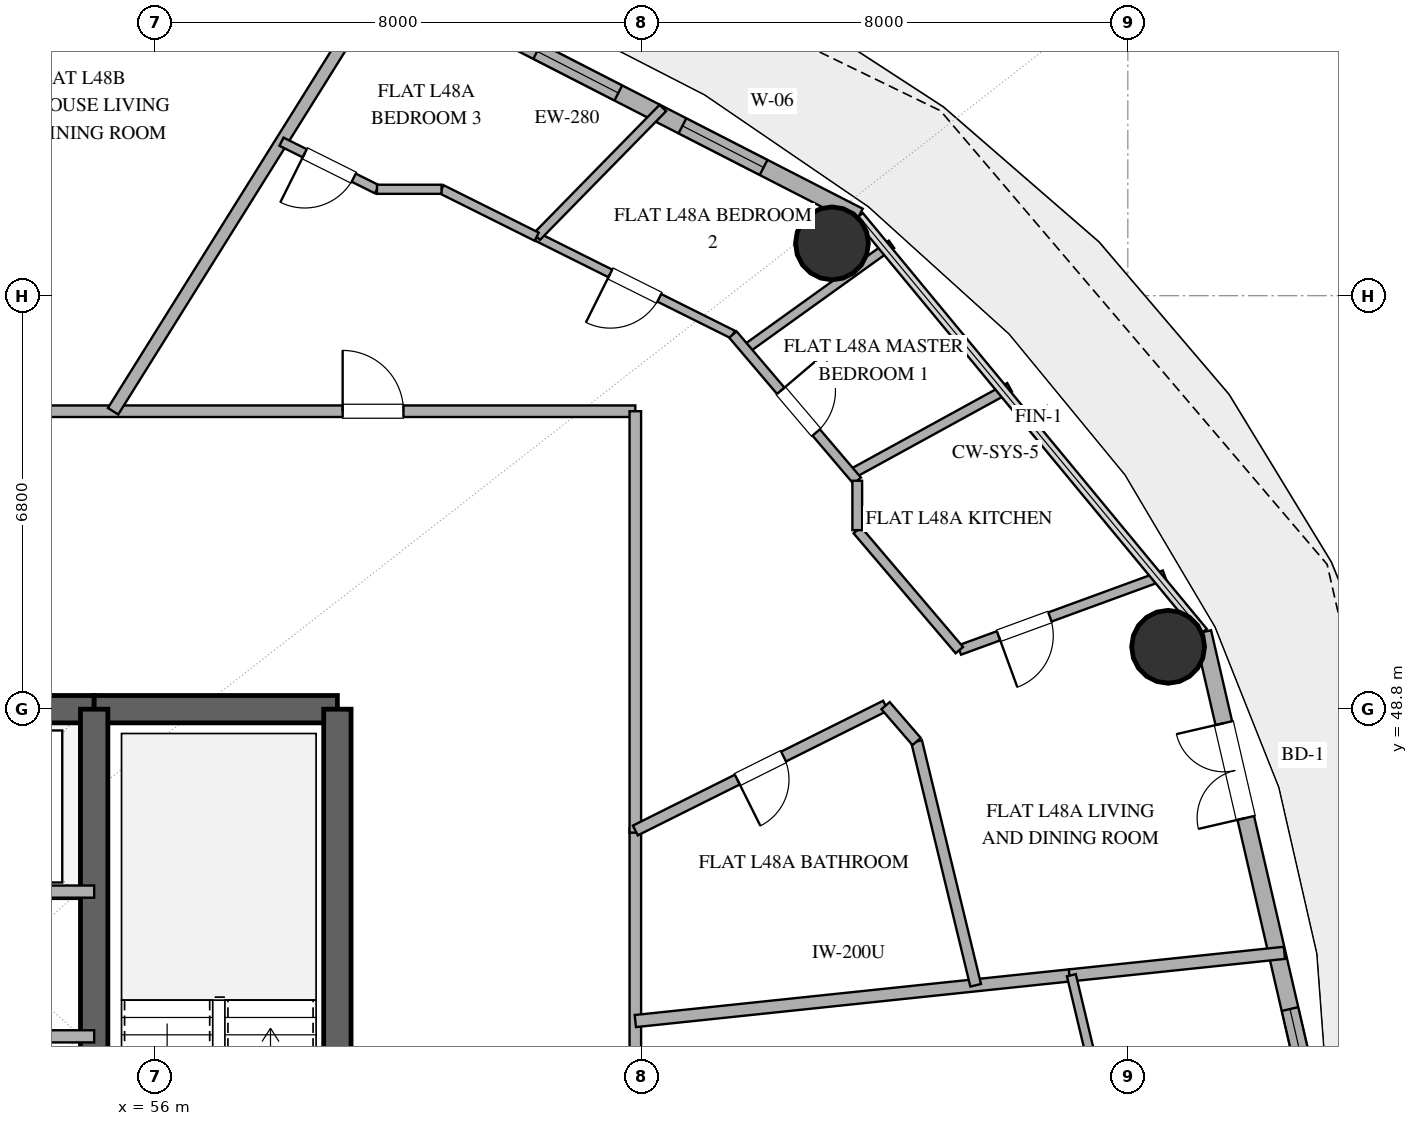
"""IFC4 building model, lengths in metres.
Left out: names, types, materials, properties, quantities, classifications, styles, units other than length and angle.
Written with IfcOpenShell. Run it as: python <this file> out.ifc"""

import sys

from ifc_helpers import new_model, si_unit, direction, frame, frame_2d, origin, origin_2d, place, context, subcontext, project, spatial, rectangle, hollow_circle, extrude, element, fill, save


model = new_model("IFC4")
c1 = context("Model", 3, precision=1e-05, world=origin(), true_north=direction((0.0, 1.0)))
c2 = subcontext(c1, "Body", "Model", "MODEL_VIEW")
j1 = project(units=[si_unit("LENGTHUNIT", "METRE"), si_unit("PLANEANGLEUNIT", "RADIAN")], contexts=[c1])
p1 = place(None, origin())
s1 = spatial("IfcSite", under=j1, at=p1, CompositionType="ELEMENT")
p2 = place(p1, origin())
s2 = spatial("IfcBuilding", under=s1, at=p2, CompositionType="ELEMENT")
p3 = place(p2, frame((0.0, 0.0, 190.2)))
s3 = spatial("IfcBuildingStorey", under=s2, at=p3, CompositionType="ELEMENT", Elevation=190.2)
p4 = place(p3, frame((41.0, 48.8, 0.0), z_axis=(0.0, 0.0, 1.0), x_axis=(1.0, 0.0, 0.0)))
e1 = element("IfcWall", 1, at=p4, inside=s3, PredefinedType="SHEAR", context=c2, shape_type="SweptSolid", body=[
    extrude(rectangle(XDim=14.0, YDim=0.45, at=frame_2d((7.0, 0.0))), origin(), (0.0, 0.0, 1.0), 3.38),
])
p5 = place(p4, frame((6.1, 0.0, 0.0)))
e2 = element("IfcOpeningElement", 2, at=p5, cuts=e1, PredefinedType="OPENING", context=c2, shape_type="SweptSolid", body=[
    extrude(rectangle(XDim=1.8, YDim=2.25, at=frame_2d((0.9, 1.125))), frame((0.0, 0.235, 0.0), z_axis=(0.0, -1.0, 0.0), x_axis=(1.0, 0.0, 0.0)), (0.0, 0.0, 1.0), 0.47),
])
p6 = place(p3, frame((55.0, 48.8, 0.0), z_axis=(0.0, 0.0, 1.0), x_axis=(1.0, 0.0, 0.0)))
e3 = element("IfcWall", 3, at=p6, inside=s3, PredefinedType="SHEAR", context=c2, shape_type="SweptSolid", body=[
    extrude(rectangle(XDim=4.0, YDim=0.45, at=frame_2d((2.0, 0.0))), origin(), (0.0, 0.0, 1.0), 3.38),
])
p7 = place(p3, frame((59.0, 35.2, 0.0), z_axis=(0.0, 0.0, 1.0), x_axis=(0.0, 1.0, 0.0)))
e4 = element("IfcWall", 4, at=p7, inside=s3, PredefinedType="SHEAR", context=c2, shape_type="SweptSolid", body=[
    extrude(rectangle(XDim=13.6, YDim=0.45, at=frame_2d((6.8, 0.0))), origin(), (0.0, 0.0, 1.0), 3.38),
])
p8 = place(p3, frame((55.0, 35.2, 0.0), z_axis=(0.0, 0.0, 1.0), x_axis=(0.0, 1.0, 0.0)))
e5 = element("IfcWall", 5, at=p8, inside=s3, PredefinedType="SHEAR", context=c2, shape_type="SweptSolid", body=[
    extrude(rectangle(XDim=13.6, YDim=0.45, at=frame_2d((6.8, 0.0))), origin(), (0.0, 0.0, 1.0), 3.38),
])
p9 = place(p8, frame((1.15, 0.0, 0.0)))
e6 = element("IfcOpeningElement", 6, at=p9, cuts=e5, PredefinedType="OPENING", context=c2, shape_type="SweptSolid", body=[
    extrude(rectangle(XDim=1.1, YDim=2.2, at=frame_2d((0.55, 1.1))), frame((0.0, 0.235, 0.0), z_axis=(0.0, -1.0, 0.0), x_axis=(1.0, 0.0, 0.0)), (0.0, 0.0, 1.0), 0.47),
])
for number, where, z_axis, x_axis in (
    (7, (72.662, 49.826, 0.0), (0.0, 0.0, 1.0), (1.0, 0.0, 0.0)),
    (8, (67.134, 56.46, 0.0), (0.0, 0.0, 1.0), (1.0, 0.0, 0.0)),
):
    element("IfcColumn", number, at=place(p3, frame(where, z_axis=z_axis, x_axis=x_axis)), inside=s3, PredefinedType="COLUMN", context=c2, shape_type="SweptSolid", body=[
        extrude(hollow_circle(Radius=0.6, WallThickness=0.032, at=origin_2d()), origin(), (0.0, 0.0, 1.0), 3.38),
    ])
p10 = place(p3, frame((75.099, 42.0, 0.0), z_axis=(0.0, 0.0, 1.0), x_axis=(-0.225473184558, 0.974249374157, 0.0)))
e9 = element("IfcWall", 9, at=p10, inside=s3, PredefinedType="SOLIDWALL", context=c2, shape_type="SweptSolid", body=[
    extrude(rectangle(XDim=8.28, YDim=0.28, at=frame_2d((4.14, 0.0))), origin(), (0.0, 0.0, 1.0), 3.38),
])
p11 = place(p10, frame((5.144, 0.0, 0.0)))
e10 = element("IfcOpeningElement", 10, at=p11, cuts=e9, PredefinedType="OPENING", context=c2, shape_type="SweptSolid", body=[
    extrude(rectangle(XDim=1.6, YDim=2.25, at=frame_2d((0.8, 1.125))), frame((0.0, 0.15, 0.0), z_axis=(0.0, -1.0, 0.0), x_axis=(1.0, 0.0, 0.0)), (0.0, 0.0, 1.0), 0.3),
])
p12 = place(p10, frame((0.918, 0.0, 0.85)))
e11 = element("IfcOpeningElement", 11, at=p12, cuts=e9, PredefinedType="OPENING", context=c2, shape_type="SweptSolid", body=[
    extrude(rectangle(XDim=1.0, YDim=1.8, at=frame_2d((0.5, 0.9))), frame((0.0, 0.15, 0.0), z_axis=(0.0, -1.0, 0.0), x_axis=(1.0, 0.0, 0.0)), (0.0, 0.0, 1.0), 0.3),
])
p13 = place(p3, frame((67.576, 56.906, 0.0), z_axis=(0.0, 0.0, 1.0), x_axis=(-0.889872523182, 0.456209263919, 0.0)))
e12 = element("IfcWall", 12, at=p13, inside=s3, PredefinedType="SOLIDWALL", context=c2, shape_type="SweptSolid", body=[
    extrude(rectangle(XDim=10.016, YDim=0.28, at=frame_2d((5.008, 0.0))), origin(), (0.0, 0.0, 1.0), 3.38),
])
p14 = place(p13, frame((1.76, 0.0, 0.85)))
e13 = element("IfcOpeningElement", 13, at=p14, cuts=e12, PredefinedType="OPENING", context=c2, shape_type="SweptSolid", body=[
    extrude(rectangle(XDim=1.5, YDim=2.0, at=frame_2d((0.75, 1.0))), frame((0.0, 0.15, 0.0), z_axis=(0.0, -1.0, 0.0), x_axis=(1.0, 0.0, 0.0)), (0.0, 0.0, 1.0), 0.3),
])
p15 = place(p13, frame((4.445, 0.0, 0.85)))
e14 = element("IfcOpeningElement", 14, at=p15, cuts=e12, PredefinedType="OPENING", context=c2, shape_type="SweptSolid", body=[
    extrude(rectangle(XDim=1.5, YDim=1.8, at=frame_2d((0.75, 0.9))), frame((0.0, 0.15, 0.0), z_axis=(0.0, -1.0, 0.0), x_axis=(1.0, 0.0, 0.0)), (0.0, 0.0, 1.0), 0.3),
])
p16 = place(p13, frame((6.459, 0.0, 0.85)))
e15 = element("IfcOpeningElement", 15, at=p16, cuts=e12, PredefinedType="OPENING", context=c2, shape_type="SweptSolid", body=[
    extrude(rectangle(XDim=1.5, YDim=1.8, at=frame_2d((0.75, 0.9))), frame((0.0, 0.15, 0.0), z_axis=(0.0, -1.0, 0.0), x_axis=(1.0, 0.0, 0.0)), (0.0, 0.0, 1.0), 0.3),
])
for number, where, z_axis, x_axis in (
    (16, (52.05, 43.42, 0.0), (0.0, 0.0, 1.0), (1.0, 0.0, 0.0)),
    (17, (52.05, 45.8, 0.0), (0.0, 0.0, 1.0), (1.0, 0.0, 0.0)),
):
    element("IfcWall", number, at=place(p3, frame(where, z_axis=z_axis, x_axis=x_axis)), inside=s3, PredefinedType="SOLIDWALL", context=c2, shape_type="SweptSolid", body=[
        extrude(rectangle(XDim=2.95, YDim=0.2, at=frame_2d((1.475, 0.0))), origin(), (0.0, 0.0, 1.0), 2.74),
    ])
p17 = place(p3, frame((44.784, 53.7, 0.0), z_axis=(0.0, 0.0, 1.0), x_axis=(1.0, 0.0, 0.0)))
e18 = element("IfcWall", 18, at=p17, inside=s3, PredefinedType="PARTITIONING", context=c2, shape_type="SweptSolid", body=[
    extrude(rectangle(XDim=19.116, YDim=0.19, at=frame_2d((9.558, 0.0))), origin(), (0.0, 0.0, 1.0), 2.74),
])
p18 = place(p17, frame((14.302, 0.0, 0.0)))
e19 = element("IfcOpeningElement", 19, at=p18, cuts=e18, PredefinedType="OPENING", context=c2, shape_type="SweptSolid", body=[
    extrude(rectangle(XDim=1.0, YDim=2.2, at=frame_2d((0.5, 1.1))), frame((0.0, 0.105, 0.0), z_axis=(0.0, -1.0, 0.0), x_axis=(1.0, 0.0, 0.0)), (0.0, 0.0, 1.0), 0.21),
])
p19 = place(p17, frame((6.783, 0.0, 0.0)))
e20 = element("IfcOpeningElement", 20, at=p19, cuts=e18, PredefinedType="OPENING", context=c2, shape_type="SweptSolid", body=[
    extrude(rectangle(XDim=1.0, YDim=2.2, at=frame_2d((0.5, 1.1))), frame((0.0, 0.105, 0.0), z_axis=(0.0, -1.0, 0.0), x_axis=(1.0, 0.0, 0.0)), (0.0, 0.0, 1.0), 0.21),
])
p20 = place(p3, frame((63.9, 46.841, 0.0), z_axis=(0.0, 0.0, 1.0), x_axis=(0.0, -1.0, 0.0)))
e21 = element("IfcWall", 21, at=p20, inside=s3, PredefinedType="PARTITIONING", context=c2, shape_type="SweptSolid", body=[
    extrude(rectangle(XDim=12.632, YDim=0.19, at=frame_2d((6.316, 0.0))), origin(), (0.0, 0.0, 1.0), 2.74),
])
p21 = place(p3, frame((63.9, 53.7, 0.0), z_axis=(0.0, 0.0, 1.0), x_axis=(0.0, -1.0, 0.0)))
e22 = element("IfcWall", 22, at=p21, inside=s3, PredefinedType="PARTITIONING", context=c2, shape_type="SweptSolid", body=[
    extrude(rectangle(XDim=6.931, YDim=0.19, at=frame_2d((3.465, 0.0))), origin(), (0.0, 0.0, 1.0), 2.74),
])
p22 = place(p3, frame((63.9, 43.671, 0.0), z_axis=(0.0, 0.0, 1.0), x_axis=(0.994523063153, 0.104517351942, 0.0)))
e23 = element("IfcWall", 23, at=p22, inside=s3, PredefinedType="PARTITIONING", context=c2, shape_type="SweptSolid", body=[
    extrude(rectangle(XDim=7.211, YDim=0.2, at=frame_2d((3.605, 0.0))), origin(), (0.0, 0.0, 1.0), 2.74),
])
p23 = place(p3, frame((55.311, 53.7, 0.0), z_axis=(0.0, 0.0, 1.0), x_axis=(0.529914717401, 0.848050937315, 0.0)))
e24 = element("IfcWall", 24, at=p23, inside=s3, PredefinedType="PARTITIONING", context=c2, shape_type="SweptSolid", body=[
    extrude(rectangle(XDim=8.599, YDim=0.2, at=frame_2d((4.299, 0.0))), origin(), (0.0, 0.0, 1.0), 2.74),
])
p24 = place(p3, frame((68.016, 48.858, 0.0), z_axis=(0.0, 0.0, 1.0), x_axis=(-0.894872643331, -0.446321579377, 0.0)))
e25 = element("IfcWall", 25, at=p24, inside=s3, PredefinedType="PLUMBINGWALL", context=c2, shape_type="SweptSolid", body=[
    extrude(rectangle(XDim=4.599, YDim=0.18, at=frame_2d((2.3, 0.0))), origin(), (0.0, 0.0, 1.0), 2.74),
])
p25 = place(p24, frame((1.875, 0.0, 0.0)))
e26 = element("IfcOpeningElement", 26, at=p25, cuts=e25, PredefinedType="OPENING", context=c2, shape_type="SweptSolid", body=[
    extrude(rectangle(XDim=0.85, YDim=2.1, at=frame_2d((0.425, 1.05))), frame((0.0, 0.1, 0.0), z_axis=(0.0, -1.0, 0.0), x_axis=(1.0, 0.0, 0.0)), (0.0, 0.0, 1.0), 0.2),
])
p26 = place(p3, frame((69.498, 44.26, 0.0), z_axis=(0.0, 0.0, 1.0), x_axis=(-0.235510241151, 0.97187186723, 0.0)))
e27 = element("IfcWall", 27, at=p26, inside=s3, PredefinedType="PLUMBINGWALL", context=c2, shape_type="SweptSolid", body=[
    extrude(rectangle(XDim=4.125, YDim=0.18, at=frame_2d((2.062, 0.0))), origin(), (0.0, 0.0, 1.0), 2.74),
])
p27 = place(p3, frame((65.505, 54.961, 0.0), z_axis=(0.0, 0.0, 1.0), x_axis=(-0.894941244144, 0.4461840086, 0.0)))
e28 = element("IfcWall", 28, at=p27, inside=s3, PredefinedType="PARTITIONING", context=c2, shape_type="SweptSolid", body=[
    extrude(rectangle(XDim=3.605, YDim=0.14, at=frame_2d((1.803, 0.0))), origin(), (0.0, 0.0, 1.0), 2.74),
])
p28 = place(p27, frame((1.353, 0.0, 0.0)))
e29 = element("IfcOpeningElement", 29, at=p28, cuts=e28, PredefinedType="OPENING", context=c2, shape_type="SweptSolid", body=[
    extrude(rectangle(XDim=0.9, YDim=2.1, at=frame_2d((0.45, 1.05))), frame((0.0, 0.08, 0.0), z_axis=(0.0, -1.0, 0.0), x_axis=(1.0, 0.0, 0.0)), (0.0, 0.0, 1.0), 0.16),
])
p29 = place(p3, frame((72.603, 51.006, 0.0), z_axis=(0.0, 0.0, 1.0), x_axis=(-0.939057046145, -0.343761347572, 0.0)))
e30 = element("IfcWall", 30, at=p29, inside=s3, PredefinedType="PLUMBINGWALL", context=c2, shape_type="SweptSolid", body=[
    extrude(rectangle(XDim=3.592, YDim=0.16, at=frame_2d((1.796, 0.0))), origin(), (0.0, 0.0, 1.0), 2.74),
])
p30 = place(p29, frame((2.006, 0.0, 0.0)))
e31 = element("IfcOpeningElement", 31, at=p30, cuts=e30, PredefinedType="OPENING", context=c2, shape_type="SweptSolid", body=[
    extrude(rectangle(XDim=0.9, YDim=2.1, at=frame_2d((0.45, 1.05))), frame((0.0, 0.09, 0.0), z_axis=(0.0, -1.0, 0.0), x_axis=(1.0, 0.0, 0.0)), (0.0, 0.0, 1.0), 0.18),
])
p31 = place(p3, frame((74.575, 44.793, 0.0), z_axis=(0.0, 0.0, 1.0), x_axis=(-0.994516359121, -0.104581123727, 0.0)))
e32 = element("IfcWall", 32, at=p31, inside=s3, PredefinedType="PARTITIONING", context=c2, shape_type="SweptSolid", body=[
    extrude(rectangle(XDim=3.555, YDim=0.2, at=frame_2d((1.778, 0.0))), origin(), (0.0, 0.0, 1.0), 2.74),
])
p32 = place(p3, frame((67.455, 52.668, 0.0), z_axis=(0.0, 0.0, 1.0), x_axis=(0.876839283097, 0.480783601653, 0.0)))
e33 = element("IfcWall", 33, at=p32, inside=s3, PredefinedType="PLUMBINGWALL", context=c2, shape_type="SweptSolid", body=[
    extrude(rectangle(XDim=2.965, YDim=0.16, at=frame_2d((1.482, 0.0))), origin(), (0.0, 0.0, 1.0), 2.74),
])
p33 = place(p3, frame((64.353, 58.687, 0.0), z_axis=(0.0, 0.0, 1.0), x_axis=(-0.699905055024, -0.714235895172, 0.0)))
e34 = element("IfcWall", 34, at=p33, inside=s3, PredefinedType="PARTITIONING", context=c2, shape_type="SweptSolid", body=[
    extrude(rectangle(XDim=2.964, YDim=0.15, at=frame_2d((1.482, 0.0))), origin(), (0.0, 0.0, 1.0), 2.74),
])
p34 = place(p3, frame((68.113, 56.444, 0.0), z_axis=(0.0, 0.0, 1.0), x_axis=(-0.812258557349, -0.583297553581, 0.0)))
e35 = element("IfcWall", 35, at=p34, inside=s3, PredefinedType="PARTITIONING", context=c2, shape_type="SweptSolid", body=[
    extrude(rectangle(XDim=2.958, YDim=0.15, at=frame_2d((1.479, 0.0))), origin(), (0.0, 0.0, 1.0), 2.74),
])
p35 = place(p3, frame((65.505, 54.961, 0.0), z_axis=(0.0, 0.0, 1.0), x_axis=(0.647888606369, -0.761735094201, 0.0)))
e36 = element("IfcWall", 36, at=p35, inside=s3, PredefinedType="PLUMBINGWALL", context=c2, shape_type="SweptSolid", body=[
    extrude(rectangle(XDim=3.157, YDim=0.16, at=frame_2d((1.578, 0.0))), origin(), (0.0, 0.0, 1.0), 2.74),
])
p36 = place(p35, frame((1.215, 0.0, 0.0)))
e37 = element("IfcOpeningElement", 37, at=p36, cuts=e36, PredefinedType="OPENING", context=c2, shape_type="SweptSolid", body=[
    extrude(rectangle(XDim=0.9, YDim=2.1, at=frame_2d((0.45, 1.05))), frame((0.0, 0.09, 0.0), z_axis=(0.0, -1.0, 0.0), x_axis=(1.0, 0.0, 0.0)), (0.0, 0.0, 1.0), 0.18),
])
p37 = place(p3, frame((69.229, 49.771, 0.0), z_axis=(0.0, 0.0, 1.0), x_axis=(-0.648055845939, 0.761592818076, 0.0)))
e38 = element("IfcWall", 38, at=p37, inside=s3, PredefinedType="PLUMBINGWALL", context=c2, shape_type="SweptSolid", body=[
    extrude(rectangle(XDim=2.591, YDim=0.16, at=frame_2d((1.295, 0.0))), origin(), (0.0, 0.0, 1.0), 2.74),
])
p38 = place(p3, frame((71.649, 42.0, 0.0), z_axis=(0.0, 0.0, 1.0), x_axis=(-0.231642596653, 0.972800959814, 0.0)))
e39 = element("IfcWall", 39, at=p38, inside=s3, PredefinedType="PARTITIONING", context=c2, shape_type="SweptSolid", body=[
    extrude(rectangle(XDim=2.493, YDim=0.15, at=frame_2d((1.246, 0.0))), origin(), (0.0, 0.0, 1.0), 2.74),
])
p39 = place(p3, frame((59.651, 57.35, 0.0), z_axis=(0.0, 0.0, 1.0), x_axis=(-0.895038630404, 0.445988621027, 0.0)))
e40 = element("IfcWall", 40, at=p39, inside=s3, PredefinedType="PARTITIONING", context=c2, shape_type="SweptSolid", body=[
    extrude(rectangle(XDim=1.754, YDim=0.15, at=frame_2d((0.877, 0.0))), origin(), (0.0, 0.0, 1.0), 2.74),
])
p40 = place(p39, frame((0.427, 0.0, 0.0)))
e41 = element("IfcOpeningElement", 41, at=p40, cuts=e40, PredefinedType="OPENING", context=c2, shape_type="SweptSolid", body=[
    extrude(rectangle(XDim=0.9, YDim=2.1, at=frame_2d((0.45, 1.05))), frame((0.0, 0.085, 0.0), z_axis=(0.0, -1.0, 0.0), x_axis=(1.0, 0.0, 0.0)), (0.0, 0.0, 1.0), 0.17),
])
p41 = place(p3, frame((62.278, 56.57, 0.0), z_axis=(0.0, 0.0, 1.0), x_axis=(-0.894929238491, 0.446208088333, 0.0)))
e42 = element("IfcWall", 42, at=p41, inside=s3, PredefinedType="PARTITIONING", context=c2, shape_type="SweptSolid", body=[
    extrude(rectangle(XDim=1.749, YDim=0.15, at=frame_2d((0.875, 0.0))), origin(), (0.0, 0.0, 1.0), 2.74),
])
p42 = place(p3, frame((60.713, 57.35, 0.0), z_axis=(0.0, 0.0, 1.0), x_axis=(-1.0, 0.0, 0.0)))
e43 = element("IfcWall", 43, at=p42, inside=s3, PredefinedType="PARTITIONING", context=c2, shape_type="SweptSolid", body=[
    extrude(rectangle(XDim=1.062, YDim=0.15, at=frame_2d((0.531, 0.0))), origin(), (0.0, 0.0, 1.0), 2.74),
])
p43 = place(p3, frame((67.55, 51.744, 0.0), z_axis=(0.0, 0.0, 1.0), x_axis=(0.0, 1.0, 0.0)))
e44 = element("IfcWall", 44, at=p43, inside=s3, PredefinedType="PLUMBINGWALL", context=c2, shape_type="SweptSolid", body=[
    extrude(rectangle(XDim=0.812, YDim=0.16, at=frame_2d((0.406, 0.0))), origin(), (0.0, 0.0, 1.0), 2.74),
])
p44 = place(p3, frame((68.526, 48.268, 0.0), z_axis=(0.0, 0.0, 1.0), x_axis=(-0.654572928685, 0.755998863116, 0.0)))
e45 = element("IfcWall", 45, at=p44, inside=s3, PredefinedType="PLUMBINGWALL", context=c2, shape_type="SweptSolid", body=[
    extrude(rectangle(XDim=0.78, YDim=0.18, at=frame_2d((0.39, 0.0))), origin(), (0.0, 0.0, 1.0), 2.74),
])
p45 = place(p11, origin())
e46 = element("IfcDoor", 46, at=p45, inside=s3, OperationType="DOUBLE_DOOR_SINGLE_SWING", PredefinedType="DOOR", context=c2, shape_type="SweptSolid", body=[
    extrude(rectangle(XDim=1.6, YDim=2.25, at=frame_2d((0.8, 1.125))), frame((0.0, 0.025, 0.0), z_axis=(0.0, -1.0, 0.0), x_axis=(1.0, 0.0, 0.0)), (0.0, 0.0, 1.0), 0.05),
])
fill(e10, e46)
p46 = place(p14, origin())
e47 = element("IfcWindow", 47, at=p46, inside=s3, PartitioningType="SINGLE_PANEL", PredefinedType="WINDOW", context=c2, shape_type="SweptSolid", body=[
    extrude(rectangle(XDim=1.5, YDim=2.0, at=frame_2d((0.75, 1.0))), frame((0.0, 0.03, 0.0), z_axis=(0.0, -1.0, 0.0), x_axis=(1.0, 0.0, 0.0)), (0.0, 0.0, 1.0), 0.06),
])
fill(e13, e47)
p47 = place(p15, origin())
e48 = element("IfcWindow", 48, at=p47, inside=s3, PartitioningType="SINGLE_PANEL", PredefinedType="WINDOW", context=c2, shape_type="SweptSolid", body=[
    extrude(rectangle(XDim=1.5, YDim=1.8, at=frame_2d((0.75, 0.9))), frame((0.0, 0.03, 0.0), z_axis=(0.0, -1.0, 0.0), x_axis=(1.0, 0.0, 0.0)), (0.0, 0.0, 1.0), 0.06),
])
fill(e14, e48)
p48 = place(p12, origin())
e49 = element("IfcWindow", 49, at=p48, inside=s3, PartitioningType="SINGLE_PANEL", PredefinedType="WINDOW", context=c2, shape_type="SweptSolid", body=[
    extrude(rectangle(XDim=1.0, YDim=1.8, at=frame_2d((0.5, 0.9))), frame((0.0, 0.03, 0.0), z_axis=(0.0, -1.0, 0.0), x_axis=(1.0, 0.0, 0.0)), (0.0, 0.0, 1.0), 0.06),
])
fill(e11, e49)
p49 = place(p18, origin())
e50 = element("IfcDoor", 50, at=p49, inside=s3, OperationType="SINGLE_SWING_LEFT", PredefinedType="DOOR", context=c2, shape_type="SweptSolid", body=[
    extrude(rectangle(XDim=1.0, YDim=2.2, at=frame_2d((0.5, 1.1))), frame((0.0, 0.025, 0.0), z_axis=(0.0, -1.0, 0.0), x_axis=(1.0, 0.0, 0.0)), (0.0, 0.0, 1.0), 0.05),
])
fill(e19, e50)
p50 = place(p25, origin())
e51 = element("IfcDoor", 51, at=p50, inside=s3, OperationType="SINGLE_SWING_RIGHT", PredefinedType="DOOR", context=c2, shape_type="SweptSolid", body=[
    extrude(rectangle(XDim=0.85, YDim=2.1, at=frame_2d((0.425, 1.05))), frame((0.0, 0.025, 0.0), z_axis=(0.0, -1.0, 0.0), x_axis=(1.0, 0.0, 0.0)), (0.0, 0.0, 1.0), 0.05),
])
fill(e26, e51)
p51 = place(p28, origin())
e52 = element("IfcDoor", 52, at=p51, inside=s3, OperationType="SINGLE_SWING_RIGHT", PredefinedType="DOOR", context=c2, shape_type="SweptSolid", body=[
    extrude(rectangle(XDim=0.9, YDim=2.1, at=frame_2d((0.45, 1.05))), frame((0.0, 0.025, 0.0), z_axis=(0.0, -1.0, 0.0), x_axis=(1.0, 0.0, 0.0)), (0.0, 0.0, 1.0), 0.05),
])
fill(e29, e52)
p52 = place(p30, origin())
e53 = element("IfcDoor", 53, at=p52, inside=s3, OperationType="SINGLE_SWING_RIGHT", PredefinedType="DOOR", context=c2, shape_type="SweptSolid", body=[
    extrude(rectangle(XDim=0.9, YDim=2.1, at=frame_2d((0.45, 1.05))), frame((0.0, 0.025, 0.0), z_axis=(0.0, -1.0, 0.0), x_axis=(1.0, 0.0, 0.0)), (0.0, 0.0, 1.0), 0.05),
])
fill(e31, e53)
p53 = place(p36, origin())
e54 = element("IfcDoor", 54, at=p53, inside=s3, OperationType="SINGLE_SWING_LEFT", PredefinedType="DOOR", context=c2, shape_type="SweptSolid", body=[
    extrude(rectangle(XDim=0.9, YDim=2.1, at=frame_2d((0.45, 1.05))), frame((0.0, 0.025, 0.0), z_axis=(0.0, -1.0, 0.0), x_axis=(1.0, 0.0, 0.0)), (0.0, 0.0, 1.0), 0.05),
])
fill(e37, e54)
p54 = place(p40, origin())
e55 = element("IfcDoor", 55, at=p54, inside=s3, OperationType="SINGLE_SWING_RIGHT", PredefinedType="DOOR", context=c2, shape_type="SweptSolid", body=[
    extrude(rectangle(XDim=0.9, YDim=2.1, at=frame_2d((0.45, 1.05))), frame((0.0, 0.025, 0.0), z_axis=(0.0, -1.0, 0.0), x_axis=(1.0, 0.0, 0.0)), (0.0, 0.0, 1.0), 0.05),
])
fill(e41, e55)
save(model, sys.argv[1])
